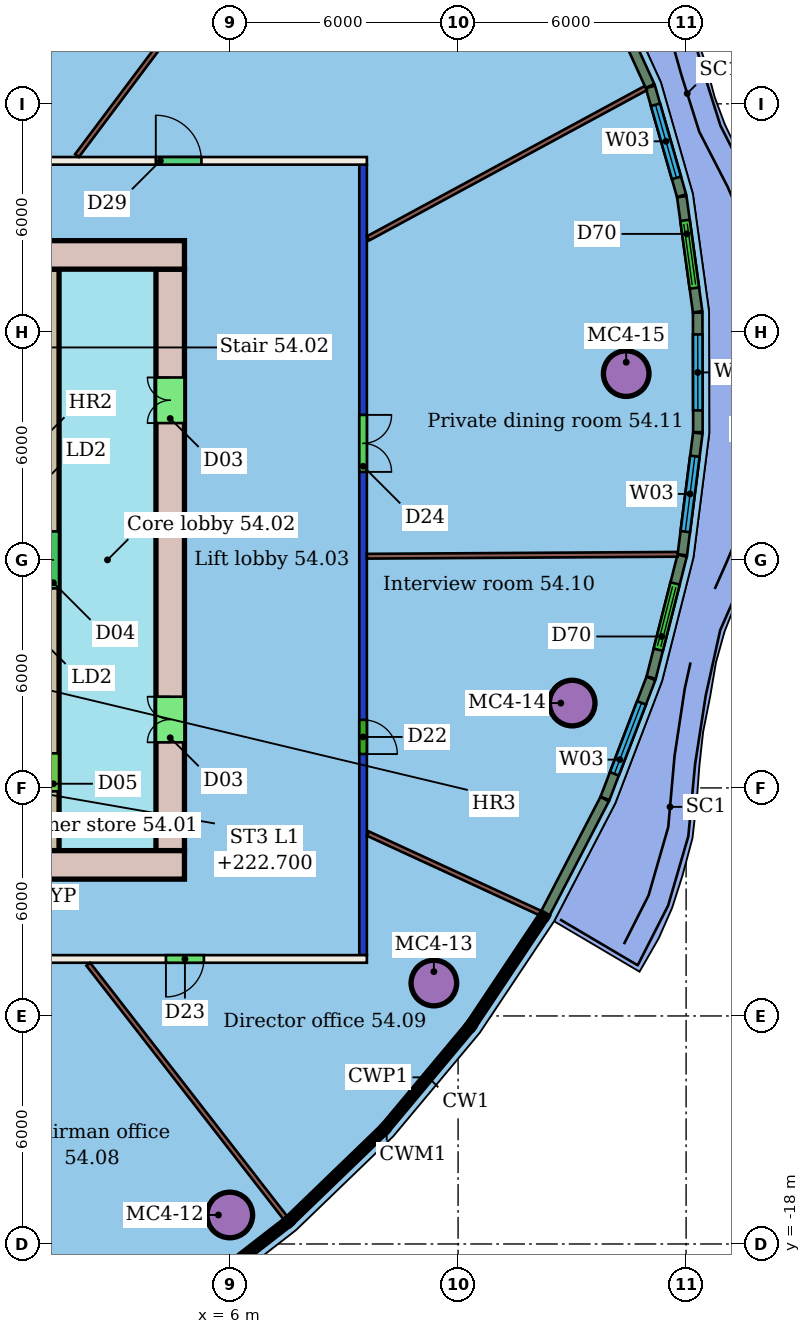
"""IFC4 building model, lengths in metres.
Left out: names, types, materials, properties, quantities, classifications, styles, units other than length and angle.
Written with IfcOpenShell. Run it as: python <this file> out.ifc"""

import sys

from ifc_helpers import new_model, si_unit, direction, frame, frame_2d, origin, origin_2d, place, context, subcontext, project, spatial, rectangle, hollow_circle, extrude, element, fill, save


model = new_model("IFC4")
c1 = context("Model", 3, precision=1e-05, world=origin(), true_north=direction((0.0, 1.0)))
c2 = subcontext(c1, "Body", "Model", "MODEL_VIEW")
j1 = project(units=[si_unit("LENGTHUNIT", "METRE"), si_unit("PLANEANGLEUNIT", "RADIAN")], contexts=[c1])
p1 = place(None, origin())
s1 = spatial("IfcSite", under=j1, at=p1, CompositionType="ELEMENT")
p2 = place(p1, origin())
s2 = spatial("IfcBuilding", under=s1, at=p2, CompositionType="ELEMENT")
p3 = place(p2, frame((0.0, 0.0, 220.9)))
s3 = spatial("IfcBuildingStorey", under=s2, at=p3, CompositionType="ELEMENT", Elevation=220.9)
for number, where, z_axis, x_axis in (
    (1, (5.993, -17.237, 0.0), (0.0, 0.0, 1.0), (1.0, 0.0, 0.0)),
    (2, (11.363, -11.134, 0.0), (0.0, 0.0, 1.0), (1.0, 0.0, 0.0)),
    (3, (15.003, -3.768, 0.0), (0.0, 0.0, 1.0), (1.0, 0.0, 0.0)),
    (4, (16.424, 4.901, 0.0), (0.0, 0.0, 1.0), (1.0, 0.0, 0.0)),
):
    element("IfcColumn", number, at=place(p3, frame(where, z_axis=z_axis, x_axis=x_axis)), inside=s3, PredefinedType="COLUMN", context=c2, shape_type="SweptSolid", body=[
        extrude(hollow_circle(Radius=0.6, WallThickness=0.045, at=origin_2d()), origin(), (0.0, 0.0, 1.0), 3.45),
    ])
p4 = place(p3, frame((9.6, -10.5, 0.0), z_axis=(0.0, 0.0, 1.0), x_axis=(-1.0, 0.0, 0.0)))
e5 = element("IfcWall", 5, at=p4, inside=s3, PredefinedType="PARTITIONING", context=c2, shape_type="SweptSolid", body=[
    extrude(rectangle(XDim=31.2, YDim=0.2, at=frame_2d((15.6, 0.0))), origin(), (0.0, 0.0, 1.0), 3.45),
])
p5 = place(p4, frame((18.444, 0.0, 0.0)))
e6 = element("IfcOpeningElement", 6, at=p5, cuts=e5, PredefinedType="OPENING", context=c2, shape_type="SweptSolid", body=[
    extrude(rectangle(XDim=1.8, YDim=2.1, at=frame_2d((0.9, 1.05))), frame((0.0, 0.11, 0.0), z_axis=(0.0, -1.0, 0.0), x_axis=(1.0, 0.0, 0.0)), (0.0, 0.0, 1.0), 0.22),
])
p6 = place(p4, frame((12.487, 0.0, 0.0)))
e7 = element("IfcOpeningElement", 7, at=p6, cuts=e5, PredefinedType="OPENING", context=c2, shape_type="SweptSolid", body=[
    extrude(rectangle(XDim=1.2, YDim=2.4, at=frame_2d((0.6, 1.2))), frame((0.0, 0.11, 0.0), z_axis=(0.0, -1.0, 0.0), x_axis=(1.0, 0.0, 0.0)), (0.0, 0.0, 1.0), 0.22),
])
p7 = place(p4, frame((8.536, 0.0, 0.0)))
e8 = element("IfcOpeningElement", 8, at=p7, cuts=e5, PredefinedType="OPENING", context=c2, shape_type="SweptSolid", body=[
    extrude(rectangle(XDim=1.0, YDim=2.4, at=frame_2d((0.5, 1.2))), frame((0.0, 0.11, 0.0), z_axis=(0.0, -1.0, 0.0), x_axis=(1.0, 0.0, 0.0)), (0.0, 0.0, 1.0), 0.22),
])
p8 = place(p4, frame((4.288, 0.0, 0.0)))
e9 = element("IfcOpeningElement", 9, at=p8, cuts=e5, PredefinedType="OPENING", context=c2, shape_type="SweptSolid", body=[
    extrude(rectangle(XDim=1.0, YDim=2.4, at=frame_2d((0.5, 1.2))), frame((0.0, 0.11, 0.0), z_axis=(0.0, -1.0, 0.0), x_axis=(1.0, 0.0, 0.0)), (0.0, 0.0, 1.0), 0.22),
])
p9 = place(p3, frame((-21.6, 10.5, 0.0), z_axis=(0.0, 0.0, 1.0), x_axis=(1.0, 0.0, 0.0)))
e10 = element("IfcWall", 10, at=p9, inside=s3, PredefinedType="PARTITIONING", context=c2, shape_type="SweptSolid", body=[
    extrude(rectangle(XDim=31.2, YDim=0.2, at=frame_2d((15.6, 0.0))), origin(), (0.0, 0.0, 1.0), 3.45),
])
p10 = place(p9, frame((20.509, 0.0, 0.0)))
e11 = element("IfcOpeningElement", 11, at=p10, cuts=e10, PredefinedType="OPENING", context=c2, shape_type="SweptSolid", body=[
    extrude(rectangle(XDim=1.0, YDim=2.4, at=frame_2d((0.5, 1.2))), frame((0.0, 0.11, 0.0), z_axis=(0.0, -1.0, 0.0), x_axis=(1.0, 0.0, 0.0)), (0.0, 0.0, 1.0), 0.22),
])
p11 = place(p9, frame((13.001, 0.0, 0.0)))
e12 = element("IfcOpeningElement", 12, at=p11, cuts=e10, PredefinedType="OPENING", context=c2, shape_type="SweptSolid", body=[
    extrude(rectangle(XDim=0.9, YDim=2.1, at=frame_2d((0.45, 1.05))), frame((0.0, 0.11, 0.0), z_axis=(0.0, -1.0, 0.0), x_axis=(1.0, 0.0, 0.0)), (0.0, 0.0, 1.0), 0.22),
])
p12 = place(p9, frame((9.617, 0.0, 0.0)))
e13 = element("IfcOpeningElement", 13, at=p12, cuts=e10, PredefinedType="OPENING", context=c2, shape_type="SweptSolid", body=[
    extrude(rectangle(XDim=0.9, YDim=2.1, at=frame_2d((0.45, 1.05))), frame((0.0, 0.11, 0.0), z_axis=(0.0, -1.0, 0.0), x_axis=(1.0, 0.0, 0.0)), (0.0, 0.0, 1.0), 0.22),
])
p13 = place(p9, frame((25.646, 0.0, 0.0)))
e14 = element("IfcOpeningElement", 14, at=p13, cuts=e10, PredefinedType="OPENING", context=c2, shape_type="SweptSolid", body=[
    extrude(rectangle(XDim=1.2, YDim=2.4, at=frame_2d((0.6, 1.2))), frame((0.0, 0.11, 0.0), z_axis=(0.0, -1.0, 0.0), x_axis=(1.0, 0.0, 0.0)), (0.0, 0.0, 1.0), 0.22),
])
p14 = place(p3, frame((9.5, 10.4, 0.0), z_axis=(0.0, 0.0, 1.0), x_axis=(0.0, -1.0, 0.0)))
e15 = element("IfcWall", 15, at=p14, inside=s3, PredefinedType="PARTITIONING", context=c2, shape_type="SweptSolid", body=[
    extrude(rectangle(XDim=20.8, YDim=0.2, at=frame_2d((10.4, 0.0))), origin(), (0.0, 0.0, 1.0), 3.05),
])
p15 = place(p14, frame((14.609, 0.0, 0.0)))
e16 = element("IfcOpeningElement", 16, at=p15, cuts=e15, PredefinedType="OPENING", context=c2, shape_type="SweptSolid", body=[
    extrude(rectangle(XDim=0.9, YDim=2.1, at=frame_2d((0.45, 1.05))), frame((0.0, 0.11, 0.0), z_axis=(0.0, -1.0, 0.0), x_axis=(1.0, 0.0, 0.0)), (0.0, 0.0, 1.0), 0.22),
])
p16 = place(p14, frame((6.585, 0.0, 0.0)))
e17 = element("IfcOpeningElement", 17, at=p16, cuts=e15, PredefinedType="OPENING", context=c2, shape_type="SweptSolid", body=[
    extrude(rectangle(XDim=1.5, YDim=2.1, at=frame_2d((0.75, 1.05))), frame((0.0, 0.11, 0.0), z_axis=(0.0, -1.0, 0.0), x_axis=(1.0, 0.0, 0.0)), (0.0, 0.0, 1.0), 0.22),
])
p17 = place(p3, frame((9.991, 21.337, 0.0), z_axis=(0.0, 0.0, 1.0), x_axis=(-0.599716591432, -0.800212478009, 0.0)))
e18 = element("IfcWall", 18, at=p17, inside=s3, PredefinedType="PARTITIONING", context=c2, shape_type="SweptSolid", body=[
    extrude(rectangle(XDim=13.371, YDim=0.125, at=frame_2d((6.686, 0.0))), origin(), (0.0, 0.0, 1.0), 3.45),
])
p18 = place(p3, frame((1.765, -21.249, 0.0), z_axis=(0.0, 0.0, 1.0), x_axis=(-0.343220407619, 0.939254891813, 0.0)))
e19 = element("IfcWall", 19, at=p18, inside=s3, PredefinedType="PARTITIONING", context=c2, shape_type="SweptSolid", body=[
    extrude(rectangle(XDim=11.315, YDim=0.125, at=frame_2d((5.657, 0.0))), origin(), (0.0, 0.0, 1.0), 3.45),
])
p19 = place(p3, frame((7.457, -17.314, 0.0), z_axis=(0.0, 0.0, 1.0), x_axis=(-0.613674696521, 0.789558969837, 0.0)))
e20 = element("IfcWall", 20, at=p19, inside=s3, PredefinedType="PARTITIONING", context=c2, shape_type="SweptSolid", body=[
    extrude(rectangle(XDim=8.455, YDim=0.125, at=frame_2d((4.228, 0.0))), origin(), (0.0, 0.0, 1.0), 3.45),
])
p20 = place(p3, frame((14.161, -9.292, 0.0), z_axis=(0.0, 0.0, 1.0), x_axis=(-0.908192487976, 0.4185527503, 0.0)))
e21 = element("IfcWall", 21, at=p20, inside=s3, PredefinedType="PARTITIONING", context=c2, shape_type="SweptSolid", body=[
    extrude(rectangle(XDim=4.994, YDim=0.125, at=frame_2d((2.497, 0.0))), origin(), (0.0, 0.0, 1.0), 3.45),
])
p21 = place(p3, frame((17.777, 0.147, 0.0), z_axis=(0.0, 0.0, 1.0), x_axis=(-0.999980899619, -0.006180646927, 0.0)))
e22 = element("IfcWall", 22, at=p21, inside=s3, PredefinedType="PARTITIONING", context=c2, shape_type="SweptSolid", body=[
    extrude(rectangle(XDim=8.177, YDim=0.125, at=frame_2d((4.088, 0.0))), origin(), (0.0, 0.0, 1.0), 3.45),
])
p22 = place(p3, frame((16.939, 12.415, 0.0), z_axis=(0.0, 0.0, 1.0), x_axis=(-0.879463626067, -0.47596610218, 0.0)))
e23 = element("IfcWall", 23, at=p22, inside=s3, PredefinedType="PARTITIONING", context=c2, shape_type="SweptSolid", body=[
    extrude(rectangle(XDim=8.311, YDim=0.125, at=frame_2d((4.156, 0.0))), origin(), (0.0, 0.0, 1.0), 3.45),
])
p23 = place(p3, frame((14.294, -9.306, 0.0), z_axis=(0.0, 0.0, 1.0), x_axis=(0.460432675655, 0.887694627216, 0.0)))
e24 = element("IfcWall", 24, at=p23, inside=s3, PredefinedType="SOLIDWALL", context=c2, shape_type="SweptSolid", body=[
    extrude(rectangle(XDim=3.393, YDim=0.25, at=frame_2d((1.697, 0.0))), origin(), (0.0, 0.0, 1.0), 3.1),
])
p24 = place(p3, frame((15.866, -6.274, 0.0), z_axis=(0.0, 0.0, 1.0), x_axis=(0.35762850613, 0.933863936343, 0.0)))
e25 = element("IfcWall", 25, at=p24, inside=s3, PredefinedType="SOLIDWALL", context=c2, shape_type="SweptSolid", body=[
    extrude(rectangle(XDim=3.381, YDim=0.25, at=frame_2d((1.69, 0.0))), origin(), (0.0, 0.0, 1.0), 3.1),
])
p25 = place(p24, frame((0.69, 0.0, 0.9)))
e26 = element("IfcOpeningElement", 26, at=p25, cuts=e25, PredefinedType="OPENING", context=c2, shape_type="SweptSolid", body=[
    extrude(rectangle(XDim=2.0, YDim=2.1, at=frame_2d((1.0, 1.05))), frame((0.0, 0.135, 0.0), z_axis=(0.0, -1.0, 0.0), x_axis=(1.0, 0.0, 0.0)), (0.0, 0.0, 1.0), 0.27),
])
p26 = place(p3, frame((17.082, -3.096, 0.0), z_axis=(0.0, 0.0, 1.0), x_axis=(0.246300133035, 0.969193605255, 0.0)))
e27 = element("IfcWall", 27, at=p26, inside=s3, PredefinedType="SOLIDWALL", context=c2, shape_type="SweptSolid", body=[
    extrude(rectangle(XDim=3.31, YDim=0.25, at=frame_2d((1.655, 0.0))), origin(), (0.0, 0.0, 1.0), 3.1),
])
p27 = place(p26, frame((0.755, 0.0, 0.0)))
e28 = element("IfcOpeningElement", 28, at=p27, cuts=e27, PredefinedType="OPENING", context=c2, shape_type="SweptSolid", body=[
    extrude(rectangle(XDim=1.8, YDim=2.4, at=frame_2d((0.9, 1.2))), frame((0.0, 0.135, 0.0), z_axis=(0.0, -1.0, 0.0), x_axis=(1.0, 0.0, 0.0)), (0.0, 0.0, 1.0), 0.27),
])
p28 = place(p3, frame((17.901, 0.135, 0.0), z_axis=(0.0, 0.0, 1.0), x_axis=(0.126351687355, 0.991985509522, 0.0)))
e29 = element("IfcWall", 29, at=p28, inside=s3, PredefinedType="SOLIDWALL", context=c2, shape_type="SweptSolid", body=[
    extrude(rectangle(XDim=3.229, YDim=0.25, at=frame_2d((1.614, 0.0))), origin(), (0.0, 0.0, 1.0), 3.1),
])
p29 = place(p28, frame((0.614, 0.0, 0.9)))
e30 = element("IfcOpeningElement", 30, at=p29, cuts=e29, PredefinedType="OPENING", context=c2, shape_type="SweptSolid", body=[
    extrude(rectangle(XDim=2.0, YDim=2.1, at=frame_2d((1.0, 1.05))), frame((0.0, 0.135, 0.0), z_axis=(0.0, -1.0, 0.0), x_axis=(1.0, 0.0, 0.0)), (0.0, 0.0, 1.0), 0.27),
])
p30 = place(p3, frame((18.31, 3.362, 0.0), z_axis=(0.0, 0.0, 1.0), x_axis=(-0.001631445933, 0.999998669191, 0.0)))
e31 = element("IfcWall", 31, at=p30, inside=s3, PredefinedType="SOLIDWALL", context=c2, shape_type="SweptSolid", body=[
    extrude(rectangle(XDim=3.143, YDim=0.25, at=frame_2d((1.571, 0.0))), origin(), (0.0, 0.0, 1.0), 3.1),
])
p31 = place(p30, frame((0.571, 0.0, 0.9)))
e32 = element("IfcOpeningElement", 32, at=p31, cuts=e31, PredefinedType="OPENING", context=c2, shape_type="SweptSolid", body=[
    extrude(rectangle(XDim=2.0, YDim=2.1, at=frame_2d((1.0, 1.05))), frame((0.0, 0.135, 0.0), z_axis=(0.0, -1.0, 0.0), x_axis=(1.0, 0.0, 0.0)), (0.0, 0.0, 1.0), 0.27),
])
p32 = place(p3, frame((18.303, 6.529, 0.0), z_axis=(0.0, 0.0, 1.0), x_axis=(-0.136556327804, 0.99063230784, 0.0)))
e33 = element("IfcWall", 33, at=p32, inside=s3, PredefinedType="SOLIDWALL", context=c2, shape_type="SweptSolid", body=[
    extrude(rectangle(XDim=3.057, YDim=0.25, at=frame_2d((1.529, 0.0))), origin(), (0.0, 0.0, 1.0), 3.1),
])
p33 = place(p32, frame((0.628, 0.0, 0.0)))
e34 = element("IfcOpeningElement", 34, at=p33, cuts=e33, PredefinedType="OPENING", context=c2, shape_type="SweptSolid", body=[
    extrude(rectangle(XDim=1.8, YDim=2.4, at=frame_2d((0.9, 1.2))), frame((0.0, 0.135, 0.0), z_axis=(0.0, -1.0, 0.0), x_axis=(1.0, 0.0, 0.0)), (0.0, 0.0, 1.0), 0.27),
])
p34 = place(p3, frame((17.881, 9.583, 0.0), z_axis=(0.0, 0.0, 1.0), x_axis=(-0.275630564499, 0.961263643292, 0.0)))
e35 = element("IfcWall", 35, at=p34, inside=s3, PredefinedType="SOLIDWALL", context=c2, shape_type="SweptSolid", body=[
    extrude(rectangle(XDim=2.978, YDim=0.25, at=frame_2d((1.489, 0.0))), origin(), (0.0, 0.0, 1.0), 3.1),
])
p35 = place(p34, frame((0.489, 0.0, 0.9)))
e36 = element("IfcOpeningElement", 36, at=p35, cuts=e35, PredefinedType="OPENING", context=c2, shape_type="SweptSolid", body=[
    extrude(rectangle(XDim=2.0, YDim=2.1, at=frame_2d((1.0, 1.05))), frame((0.0, 0.135, 0.0), z_axis=(0.0, -1.0, 0.0), x_axis=(1.0, 0.0, 0.0)), (0.0, 0.0, 1.0), 0.27),
])
p36 = place(p3, frame((17.051, 12.47, 0.0), z_axis=(0.0, 0.0, 1.0), x_axis=(-0.41529540963, 0.909686606882, 0.0)))
e37 = element("IfcWall", 37, at=p36, inside=s3, PredefinedType="SOLIDWALL", context=c2, shape_type="SweptSolid", body=[
    extrude(rectangle(XDim=2.871, YDim=0.25, at=frame_2d((1.435, 0.0))), origin(), (0.0, 0.0, 1.0), 3.1),
])
p37 = place(p3, frame((4.8, 8.025, 0.0), z_axis=(0.0, 0.0, 1.0), x_axis=(-1.0, 0.0, 0.0)))
e38 = element("IfcWall", 38, at=p37, inside=s3, PredefinedType="SHEAR", context=c2, shape_type="SweptSolid", body=[
    extrude(rectangle(XDim=10.8, YDim=0.75, at=frame_2d((5.4, 0.0))), origin(), (0.0, 0.0, 1.0), 3.3),
])
p38 = place(p37, frame((4.4, 0.0, 0.0)))
e39 = element("IfcOpeningElement", 39, at=p38, cuts=e38, PredefinedType="OPENING", context=c2, shape_type="SweptSolid", body=[
    extrude(rectangle(XDim=1.2, YDim=2.1, at=frame_2d((0.6, 1.05))), frame((0.0, 0.385, 0.0), z_axis=(0.0, -1.0, 0.0), x_axis=(1.0, 0.0, 0.0)), (0.0, 0.0, 1.0), 0.77),
])
p39 = place(p3, frame((-16.8, -8.025, 0.0), z_axis=(0.0, 0.0, 1.0), x_axis=(1.0, 0.0, 0.0)))
e40 = element("IfcWall", 40, at=p39, inside=s3, PredefinedType="SHEAR", context=c2, shape_type="SweptSolid", body=[
    extrude(rectangle(XDim=21.6, YDim=0.75, at=frame_2d((10.8, 0.0))), origin(), (0.0, 0.0, 1.0), 3.3),
])
p40 = place(p39, frame((4.8, 0.0, 0.0)))
e41 = element("IfcOpeningElement", 41, at=p40, cuts=e40, PredefinedType="OPENING", context=c2, shape_type="SweptSolid", body=[
    extrude(rectangle(XDim=1.2, YDim=2.1, at=frame_2d((0.6, 1.05))), frame((0.0, 0.385, 0.0), z_axis=(0.0, -1.0, 0.0), x_axis=(1.0, 0.0, 0.0)), (0.0, 0.0, 1.0), 0.77),
])
p41 = place(p3, frame((4.425, -7.65, 0.0), z_axis=(0.0, 0.0, 1.0), x_axis=(0.0, 1.0, 0.0)))
e42 = element("IfcWall", 42, at=p41, inside=s3, PredefinedType="SHEAR", context=c2, shape_type="SweptSolid", body=[
    extrude(rectangle(XDim=15.3, YDim=0.75, at=frame_2d((7.65, 0.0))), origin(), (0.0, 0.0, 1.0), 3.3),
])
p42 = place(p41, frame((2.85, 0.0, 0.0)))
e43 = element("IfcOpeningElement", 43, at=p42, cuts=e42, PredefinedType="OPENING", context=c2, shape_type="SweptSolid", body=[
    extrude(rectangle(XDim=1.2, YDim=2.1, at=frame_2d((0.6, 1.05))), frame((0.0, 0.385, 0.0), z_axis=(0.0, -1.0, 0.0), x_axis=(1.0, 0.0, 0.0)), (0.0, 0.0, 1.0), 0.77),
])
p43 = place(p41, frame((11.25, 0.0, 0.0)))
e44 = element("IfcOpeningElement", 44, at=p43, cuts=e42, PredefinedType="OPENING", context=c2, shape_type="SweptSolid", body=[
    extrude(rectangle(XDim=1.2, YDim=2.1, at=frame_2d((0.6, 1.05))), frame((0.0, 0.385, 0.0), z_axis=(0.0, -1.0, 0.0), x_axis=(1.0, 0.0, 0.0)), (0.0, 0.0, 1.0), 0.77),
])
p44 = place(p3, frame((1.35, -7.65, 0.0), z_axis=(0.0, 0.0, 1.0), x_axis=(0.0, 1.0, 0.0)))
e45 = element("IfcWall", 45, at=p44, inside=s3, PredefinedType="SHEAR", context=c2, shape_type="SweptSolid", body=[
    extrude(rectangle(XDim=15.3, YDim=0.3, at=frame_2d((7.65, 0.0))), origin(), (0.0, 0.0, 1.0), 3.3),
])
p45 = place(p44, frame((1.56, 0.0, 0.0)))
e46 = element("IfcOpeningElement", 46, at=p45, cuts=e45, PredefinedType="OPENING", context=c2, shape_type="SweptSolid", body=[
    extrude(rectangle(XDim=1.0, YDim=2.1, at=frame_2d((0.5, 1.05))), frame((0.0, 0.16, 0.0), z_axis=(0.0, -1.0, 0.0), x_axis=(1.0, 0.0, 0.0)), (0.0, 0.0, 1.0), 0.32),
])
p46 = place(p44, frame((6.9, 0.0, 0.0)))
e47 = element("IfcOpeningElement", 47, at=p46, cuts=e45, PredefinedType="OPENING", context=c2, shape_type="SweptSolid", body=[
    extrude(rectangle(XDim=1.5, YDim=2.1, at=frame_2d((0.75, 1.05))), frame((0.0, 0.16, 0.0), z_axis=(0.0, -1.0, 0.0), x_axis=(1.0, 0.0, 0.0)), (0.0, 0.0, 1.0), 0.32),
])
p47 = place(p8, origin())
e48 = element("IfcDoor", 48, at=p47, inside=s3, OperationType="SINGLE_SWING_RIGHT", PredefinedType="DOOR", context=c2, shape_type="SweptSolid", body=[
    extrude(rectangle(XDim=1.0, YDim=2.4, at=frame_2d((0.5, 1.2))), frame((0.0, 0.025, 0.0), z_axis=(0.0, -1.0, 0.0), x_axis=(1.0, 0.0, 0.0)), (0.0, 0.0, 1.0), 0.05),
])
fill(e9, e48)
p48 = place(p15, origin())
e49 = element("IfcDoor", 49, at=p48, inside=s3, OperationType="SINGLE_SWING_RIGHT", PredefinedType="DOOR", context=c2, shape_type="SweptSolid", body=[
    extrude(rectangle(XDim=0.9, YDim=2.1, at=frame_2d((0.45, 1.05))), frame((0.0, 0.025, 0.0), z_axis=(0.0, -1.0, 0.0), x_axis=(1.0, 0.0, 0.0)), (0.0, 0.0, 1.0), 0.05),
])
fill(e16, e49)
p49 = place(p16, origin())
e50 = element("IfcDoor", 50, at=p49, inside=s3, OperationType="DOUBLE_DOOR_SINGLE_SWING", PredefinedType="DOOR", context=c2, shape_type="SweptSolid", body=[
    extrude(rectangle(XDim=1.5, YDim=2.1, at=frame_2d((0.75, 1.05))), frame((0.0, 0.025, 0.0), z_axis=(0.0, -1.0, 0.0), x_axis=(1.0, 0.0, 0.0)), (0.0, 0.0, 1.0), 0.05),
])
fill(e17, e50)
p50 = place(p13, origin())
e51 = element("IfcDoor", 51, at=p50, inside=s3, OperationType="SINGLE_SWING_LEFT", PredefinedType="DOOR", context=c2, shape_type="SweptSolid", body=[
    extrude(rectangle(XDim=1.2, YDim=2.4, at=frame_2d((0.6, 1.2))), frame((0.0, 0.025, 0.0), z_axis=(0.0, -1.0, 0.0), x_axis=(1.0, 0.0, 0.0)), (0.0, 0.0, 1.0), 0.05),
])
fill(e14, e51)
p51 = place(p25, origin())
e52 = element("IfcWindow", 52, at=p51, inside=s3, PartitioningType="SINGLE_PANEL", PredefinedType="WINDOW", context=c2, shape_type="SweptSolid", body=[
    extrude(rectangle(XDim=2.0, YDim=2.1, at=frame_2d((1.0, 1.05))), frame((0.0, 0.03, 0.0), z_axis=(0.0, -1.0, 0.0), x_axis=(1.0, 0.0, 0.0)), (0.0, 0.0, 1.0), 0.06),
])
fill(e26, e52)
p52 = place(p27, origin())
e53 = element("IfcDoor", 53, at=p52, inside=s3, OperationType="DOUBLE_DOOR_SLIDING", PredefinedType="DOOR", context=c2, shape_type="SweptSolid", body=[
    extrude(rectangle(XDim=1.8, YDim=2.4, at=frame_2d((0.9, 1.2))), frame((0.0, 0.025, 0.0), z_axis=(0.0, -1.0, 0.0), x_axis=(1.0, 0.0, 0.0)), (0.0, 0.0, 1.0), 0.05),
])
fill(e28, e53)
p53 = place(p29, origin())
e54 = element("IfcWindow", 54, at=p53, inside=s3, PartitioningType="SINGLE_PANEL", PredefinedType="WINDOW", context=c2, shape_type="SweptSolid", body=[
    extrude(rectangle(XDim=2.0, YDim=2.1, at=frame_2d((1.0, 1.05))), frame((0.0, 0.03, 0.0), z_axis=(0.0, -1.0, 0.0), x_axis=(1.0, 0.0, 0.0)), (0.0, 0.0, 1.0), 0.06),
])
fill(e30, e54)
p54 = place(p31, origin())
e55 = element("IfcWindow", 55, at=p54, inside=s3, PartitioningType="SINGLE_PANEL", PredefinedType="WINDOW", context=c2, shape_type="SweptSolid", body=[
    extrude(rectangle(XDim=2.0, YDim=2.1, at=frame_2d((1.0, 1.05))), frame((0.0, 0.03, 0.0), z_axis=(0.0, -1.0, 0.0), x_axis=(1.0, 0.0, 0.0)), (0.0, 0.0, 1.0), 0.06),
])
fill(e32, e55)
p55 = place(p33, origin())
e56 = element("IfcDoor", 56, at=p55, inside=s3, OperationType="DOUBLE_DOOR_SLIDING", PredefinedType="DOOR", context=c2, shape_type="SweptSolid", body=[
    extrude(rectangle(XDim=1.8, YDim=2.4, at=frame_2d((0.9, 1.2))), frame((0.0, 0.025, 0.0), z_axis=(0.0, -1.0, 0.0), x_axis=(1.0, 0.0, 0.0)), (0.0, 0.0, 1.0), 0.05),
])
fill(e34, e56)
p56 = place(p35, origin())
e57 = element("IfcWindow", 57, at=p56, inside=s3, PartitioningType="SINGLE_PANEL", PredefinedType="WINDOW", context=c2, shape_type="SweptSolid", body=[
    extrude(rectangle(XDim=2.0, YDim=2.1, at=frame_2d((1.0, 1.05))), frame((0.0, 0.03, 0.0), z_axis=(0.0, -1.0, 0.0), x_axis=(1.0, 0.0, 0.0)), (0.0, 0.0, 1.0), 0.06),
])
fill(e36, e57)
p57 = place(p42, origin())
e58 = element("IfcDoor", 58, at=p57, inside=s3, OperationType="DOUBLE_DOOR_SINGLE_SWING", PredefinedType="NOTDEFINED", context=c2, shape_type="SweptSolid", body=[
    extrude(rectangle(XDim=1.2, YDim=2.1, at=frame_2d((0.6, 1.05))), frame((0.0, 0.025, 0.0), z_axis=(0.0, -1.0, 0.0), x_axis=(1.0, 0.0, 0.0)), (0.0, 0.0, 1.0), 0.05),
])
fill(e43, e58)
p58 = place(p43, origin())
e59 = element("IfcDoor", 59, at=p58, inside=s3, OperationType="DOUBLE_DOOR_SINGLE_SWING", PredefinedType="NOTDEFINED", context=c2, shape_type="SweptSolid", body=[
    extrude(rectangle(XDim=1.2, YDim=2.1, at=frame_2d((0.6, 1.05))), frame((0.0, 0.025, 0.0), z_axis=(0.0, -1.0, 0.0), x_axis=(1.0, 0.0, 0.0)), (0.0, 0.0, 1.0), 0.05),
])
fill(e44, e59)
p59 = place(p45, origin())
e60 = element("IfcDoor", 60, at=p59, inside=s3, OperationType="SINGLE_SWING_LEFT", PredefinedType="NOTDEFINED", context=c2, shape_type="SweptSolid", body=[
    extrude(rectangle(XDim=1.0, YDim=2.1, at=frame_2d((0.5, 1.05))), frame((0.0, 0.025, 0.0), z_axis=(0.0, -1.0, 0.0), x_axis=(1.0, 0.0, 0.0)), (0.0, 0.0, 1.0), 0.05),
])
fill(e46, e60)
p60 = place(p46, origin())
e61 = element("IfcDoor", 61, at=p60, inside=s3, OperationType="DOUBLE_DOOR_SINGLE_SWING", PredefinedType="NOTDEFINED", context=c2, shape_type="SweptSolid", body=[
    extrude(rectangle(XDim=1.5, YDim=2.1, at=frame_2d((0.75, 1.05))), frame((0.0, 0.025, 0.0), z_axis=(0.0, -1.0, 0.0), x_axis=(1.0, 0.0, 0.0)), (0.0, 0.0, 1.0), 0.05),
])
fill(e47, e61)
save(model, sys.argv[1])
